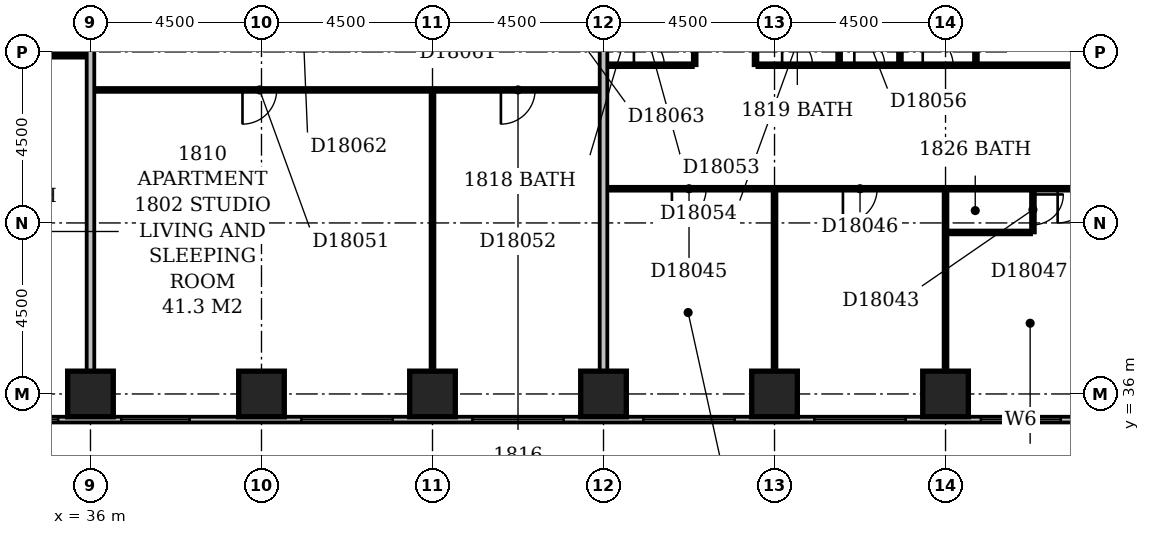
"""IFC4 building model, lengths in metres.
Left out: names, types, materials, properties, quantities, classifications, styles, units other than length and angle.
Written with IfcOpenShell. Run it as: python <this file> out.ifc"""

import sys

from ifc_helpers import new_model, si_unit, direction, frame, frame_2d, origin, origin_2d, place, context, subcontext, project, spatial, rectangle, extrude, element, fill, save


model = new_model("IFC4")
c1 = context("Model", 3, precision=1e-05, world=origin(), true_north=direction((0.0, 1.0)))
c2 = subcontext(c1, "Body", "Model", "MODEL_VIEW")
j1 = project(units=[si_unit("LENGTHUNIT", "METRE"), si_unit("PLANEANGLEUNIT", "RADIAN")], contexts=[c1])
p1 = place(None, origin())
s1 = spatial("IfcSite", under=j1, at=p1, CompositionType="ELEMENT")
p2 = place(p1, origin())
s2 = spatial("IfcBuilding", under=s1, at=p2, CompositionType="ELEMENT")
p3 = place(p2, frame((0.0, 0.0, 75.8)))
s3 = spatial("IfcBuildingStorey", under=s2, at=p3, CompositionType="ELEMENT", Elevation=75.8)
for number, where, z_axis, x_axis in (
    (1, (36.0, 36.0, -0.3), (0.0, 0.0, 1.0), (1.0, 0.0, 0.0)),
    (2, (40.5, 36.0, -0.3), (0.0, 0.0, 1.0), (1.0, 0.0, 0.0)),
    (3, (45.0, 36.0, -0.3), (0.0, 0.0, 1.0), (1.0, 0.0, 0.0)),
    (4, (49.5, 36.0, -0.3), (0.0, 0.0, 1.0), (1.0, 0.0, 0.0)),
    (5, (54.0, 36.0, -0.3), (0.0, 0.0, 1.0), (1.0, 0.0, 0.0)),
    (6, (58.5, 36.0, -0.3), (0.0, 0.0, 1.0), (1.0, 0.0, 0.0)),
):
    element("IfcColumn", number, at=place(p3, frame(where, z_axis=z_axis, x_axis=x_axis)), inside=s3, PredefinedType="COLUMN", context=c2, shape_type="SweptSolid", body=[
        extrude(rectangle(XDim=1.2, YDim=1.2, at=origin_2d()), origin(), (0.0, 0.0, 1.0), 3.6),
    ])
p4 = place(p3, frame((23.1, 35.325, 0.0), z_axis=(0.0, 0.0, 1.0), x_axis=(1.0, 0.0, 0.0)))
e7 = element("IfcWall", 7, at=p4, inside=s3, PredefinedType="STANDARD", context=c2, shape_type="SweptSolid", body=[
    extrude(rectangle(XDim=45.15, YDim=0.15, at=frame_2d((22.575, 0.0))), origin(), (0.0, 0.0, 1.0), 2.7),
])
p5 = place(p4, frame((0.45, 0.0, 0.6)))
e8 = element("IfcOpeningElement", 8, at=p5, cuts=e7, PredefinedType="OPENING", context=c2, shape_type="SweptSolid", body=[
    extrude(rectangle(XDim=2.4, YDim=1.8, at=frame_2d((1.2, 0.9))), frame((0.0, 0.087, 0.0), z_axis=(0.0, -1.0, 0.0), x_axis=(1.0, 0.0, 0.0)), (0.0, 0.0, 1.0), 0.174),
])
p6 = place(p4, frame((4.95, 0.0, 0.6)))
e9 = element("IfcOpeningElement", 9, at=p6, cuts=e7, PredefinedType="OPENING", context=c2, shape_type="SweptSolid", body=[
    extrude(rectangle(XDim=2.4, YDim=1.8, at=frame_2d((1.2, 0.9))), frame((0.0, 0.087, 0.0), z_axis=(0.0, -1.0, 0.0), x_axis=(1.0, 0.0, 0.0)), (0.0, 0.0, 1.0), 0.174),
])
p7 = place(p4, frame((10.548, 0.0, 0.6)))
e10 = element("IfcOpeningElement", 10, at=p7, cuts=e7, PredefinedType="OPENING", context=c2, shape_type="SweptSolid", body=[
    extrude(rectangle(XDim=1.5, YDim=1.8, at=frame_2d((0.75, 0.9))), frame((0.0, 0.087, 0.0), z_axis=(0.0, -1.0, 0.0), x_axis=(1.0, 0.0, 0.0)), (0.0, 0.0, 1.0), 0.174),
])
p8 = place(p4, frame((13.71, 0.0, 0.6)))
e11 = element("IfcOpeningElement", 11, at=p8, cuts=e7, PredefinedType="OPENING", context=c2, shape_type="SweptSolid", body=[
    extrude(rectangle(XDim=1.8, YDim=1.8, at=frame_2d((0.9, 0.9))), frame((0.0, 0.087, 0.0), z_axis=(0.0, -1.0, 0.0), x_axis=(1.0, 0.0, 0.0)), (0.0, 0.0, 1.0), 0.174),
])
p9 = place(p4, frame((18.45, 0.0, 0.6)))
e12 = element("IfcOpeningElement", 12, at=p9, cuts=e7, PredefinedType="OPENING", context=c2, shape_type="SweptSolid", body=[
    extrude(rectangle(XDim=2.4, YDim=1.8, at=frame_2d((1.2, 0.9))), frame((0.0, 0.087, 0.0), z_axis=(0.0, -1.0, 0.0), x_axis=(1.0, 0.0, 0.0)), (0.0, 0.0, 1.0), 0.174),
])
p10 = place(p4, frame((22.95, 0.0, 0.6)))
e13 = element("IfcOpeningElement", 13, at=p10, cuts=e7, PredefinedType="OPENING", context=c2, shape_type="SweptSolid", body=[
    extrude(rectangle(XDim=2.4, YDim=1.8, at=frame_2d((1.2, 0.9))), frame((0.0, 0.087, 0.0), z_axis=(0.0, -1.0, 0.0), x_axis=(1.0, 0.0, 0.0)), (0.0, 0.0, 1.0), 0.174),
])
p11 = place(p4, frame((27.45, 0.0, 0.6)))
e14 = element("IfcOpeningElement", 14, at=p11, cuts=e7, PredefinedType="OPENING", context=c2, shape_type="SweptSolid", body=[
    extrude(rectangle(XDim=2.4, YDim=1.8, at=frame_2d((1.2, 0.9))), frame((0.0, 0.087, 0.0), z_axis=(0.0, -1.0, 0.0), x_axis=(1.0, 0.0, 0.0)), (0.0, 0.0, 1.0), 0.174),
])
p12 = place(p4, frame((31.95, 0.0, 0.6)))
e15 = element("IfcOpeningElement", 15, at=p12, cuts=e7, PredefinedType="OPENING", context=c2, shape_type="SweptSolid", body=[
    extrude(rectangle(XDim=2.4, YDim=1.8, at=frame_2d((1.2, 0.9))), frame((0.0, 0.087, 0.0), z_axis=(0.0, -1.0, 0.0), x_axis=(1.0, 0.0, 0.0)), (0.0, 0.0, 1.0), 0.174),
])
p13 = place(p4, frame((36.331, 0.0, 0.6)))
e16 = element("IfcOpeningElement", 16, at=p13, cuts=e7, PredefinedType="OPENING", context=c2, shape_type="SweptSolid", body=[
    extrude(rectangle(XDim=2.1, YDim=1.8, at=frame_2d((1.05, 0.9))), frame((0.0, 0.087, 0.0), z_axis=(0.0, -1.0, 0.0), x_axis=(1.0, 0.0, 0.0)), (0.0, 0.0, 1.0), 0.174),
])
p14 = place(p4, frame((40.95, 0.0, 0.6)))
e17 = element("IfcOpeningElement", 17, at=p14, cuts=e7, PredefinedType="OPENING", context=c2, shape_type="SweptSolid", body=[
    extrude(rectangle(XDim=2.4, YDim=1.8, at=frame_2d((1.2, 0.9))), frame((0.0, 0.087, 0.0), z_axis=(0.0, -1.0, 0.0), x_axis=(1.0, 0.0, 0.0)), (0.0, 0.0, 1.0), 0.174),
])
p15 = place(p3, frame((36.0, 36.6, 0.0), z_axis=(0.0, 0.0, 1.0), x_axis=(0.0, 1.0, 0.0)))
e18 = element("IfcWall", 18, at=p15, inside=s3, PredefinedType="PARTITIONING", context=c2, shape_type="SweptSolid", body=[
    extrude(rectangle(XDim=12.8, YDim=0.2, at=frame_2d((6.4, 0.0))), origin(), (0.0, 0.0, 1.0), 2.4),
])
p16 = place(p3, frame((45.0, 36.6, 0.0), z_axis=(0.0, 0.0, 1.0), x_axis=(0.0, 1.0, 0.0)))
e19 = element("IfcWall", 19, at=p16, inside=s3, PredefinedType="PARTITIONING", context=c2, shape_type="SweptSolid", body=[
    extrude(rectangle(XDim=7.35, YDim=0.1, at=frame_2d((3.675, 0.0))), origin(), (0.0, 0.0, 1.0), 2.6),
])
p17 = place(p3, frame((49.5, 36.6, 0.0), z_axis=(0.0, 0.0, 1.0), x_axis=(0.0, 1.0, 0.0)))
e20 = element("IfcWall", 20, at=p17, inside=s3, PredefinedType="PARTITIONING", context=c2, shape_type="SweptSolid", body=[
    extrude(rectangle(XDim=12.8, YDim=0.2, at=frame_2d((6.4, 0.0))), origin(), (0.0, 0.0, 1.0), 3.3),
])
p18 = place(p3, frame((54.0, 36.6, 0.0), z_axis=(0.0, 0.0, 1.0), x_axis=(0.0, 1.0, 0.0)))
e21 = element("IfcWall", 21, at=p18, inside=s3, PredefinedType="PARTITIONING", context=c2, shape_type="SweptSolid", body=[
    extrude(rectangle(XDim=4.75, YDim=0.1, at=frame_2d((2.375, 0.0))), origin(), (0.0, 0.0, 1.0), 2.6),
])
p19 = place(p3, frame((58.5, 36.6, 0.0), z_axis=(0.0, 0.0, 1.0), x_axis=(0.0, 1.0, 0.0)))
e22 = element("IfcWall", 22, at=p19, inside=s3, PredefinedType="PARTITIONING", context=c2, shape_type="SweptSolid", body=[
    extrude(rectangle(XDim=4.75, YDim=0.1, at=frame_2d((2.375, 0.0))), origin(), (0.0, 0.0, 1.0), 3.3),
])
p20 = place(p3, frame((58.55, 40.25, 0.0), z_axis=(0.0, 0.0, 1.0), x_axis=(1.0, 0.0, 0.0)))
e23 = element("IfcWall", 23, at=p20, inside=s3, PredefinedType="PLUMBINGWALL", context=c2, shape_type="SweptSolid", body=[
    extrude(rectangle(XDim=2.2, YDim=0.1, at=frame_2d((1.1, 0.0))), origin(), (0.0, 0.0, 1.0), 3.3),
])
p21 = place(p3, frame((60.8, 40.25, 0.0), z_axis=(0.0, 0.0, 1.0), x_axis=(0.0, 1.0, 0.0)))
e24 = element("IfcWall", 24, at=p21, inside=s3, PredefinedType="PLUMBINGWALL", context=c2, shape_type="SweptSolid", body=[
    extrude(rectangle(XDim=1.1, YDim=0.1, at=frame_2d((0.55, 0.0))), origin(), (0.0, 0.0, 1.0), 3.3),
])
p22 = place(p21, frame((0.2, 0.0, 0.0)))
e25 = element("IfcOpeningElement", 25, at=p22, cuts=e24, PredefinedType="OPENING", context=c2, shape_type="SweptSolid", body=[
    extrude(rectangle(XDim=0.8, YDim=2.1, at=frame_2d((0.4, 1.05))), frame((0.0, 0.062, 0.0), z_axis=(0.0, -1.0, 0.0), x_axis=(1.0, 0.0, 0.0)), (0.0, 0.0, 1.0), 0.124),
])
p23 = place(p3, frame((49.6, 41.4, 0.0), z_axis=(0.0, 0.0, 1.0), x_axis=(1.0, 0.0, 0.0)))
e26 = element("IfcWall", 26, at=p23, inside=s3, PredefinedType="PARTITIONING", context=c2, shape_type="SweptSolid", body=[
    extrude(rectangle(XDim=18.5, YDim=0.1, at=frame_2d((9.25, 0.0))), origin(), (0.0, 0.0, 1.0), 3.3),
])
p24 = place(p23, frame((1.7, 0.0, 0.0)))
e27 = element("IfcOpeningElement", 27, at=p24, cuts=e26, PredefinedType="OPENING", context=c2, shape_type="SweptSolid", body=[
    extrude(rectangle(XDim=0.9, YDim=2.1, at=frame_2d((0.45, 1.05))), frame((0.0, 0.062, 0.0), z_axis=(0.0, -1.0, 0.0), x_axis=(1.0, 0.0, 0.0)), (0.0, 0.0, 1.0), 0.124),
])
p25 = place(p23, frame((6.2, 0.0, 0.0)))
e28 = element("IfcOpeningElement", 28, at=p25, cuts=e26, PredefinedType="OPENING", context=c2, shape_type="SweptSolid", body=[
    extrude(rectangle(XDim=0.9, YDim=2.1, at=frame_2d((0.45, 1.05))), frame((0.0, 0.062, 0.0), z_axis=(0.0, -1.0, 0.0), x_axis=(1.0, 0.0, 0.0)), (0.0, 0.0, 1.0), 0.124),
])
p26 = place(p23, frame((11.85, 0.0, 0.0)))
e29 = element("IfcOpeningElement", 29, at=p26, cuts=e26, PredefinedType="OPENING", context=c2, shape_type="SweptSolid", body=[
    extrude(rectangle(XDim=0.9, YDim=2.1, at=frame_2d((0.45, 1.05))), frame((0.0, 0.062, 0.0), z_axis=(0.0, -1.0, 0.0), x_axis=(1.0, 0.0, 0.0)), (0.0, 0.0, 1.0), 0.124),
])
p27 = place(p23, frame((15.2, 0.0, 0.0)))
e30 = element("IfcOpeningElement", 30, at=p27, cuts=e26, PredefinedType="OPENING", context=c2, shape_type="SweptSolid", body=[
    extrude(rectangle(XDim=0.9, YDim=2.1, at=frame_2d((0.45, 1.05))), frame((0.0, 0.062, 0.0), z_axis=(0.0, -1.0, 0.0), x_axis=(1.0, 0.0, 0.0)), (0.0, 0.0, 1.0), 0.124),
])
p28 = place(p3, frame((36.1, 44.0, 0.0), z_axis=(0.0, 0.0, 1.0), x_axis=(1.0, 0.0, 0.0)))
e31 = element("IfcWall", 31, at=p28, inside=s3, PredefinedType="PARTITIONING", context=c2, shape_type="SweptSolid", body=[
    extrude(rectangle(XDim=13.3, YDim=0.1, at=frame_2d((6.65, 0.0))), origin(), (0.0, 0.0, 1.0), 3.3),
])
p29 = place(p28, frame((3.9, 0.0, 0.0)))
e32 = element("IfcOpeningElement", 32, at=p29, cuts=e31, PredefinedType="OPENING", context=c2, shape_type="SweptSolid", body=[
    extrude(rectangle(XDim=0.9, YDim=2.1, at=frame_2d((0.45, 1.05))), frame((0.0, 0.062, 0.0), z_axis=(0.0, -1.0, 0.0), x_axis=(1.0, 0.0, 0.0)), (0.0, 0.0, 1.0), 0.124),
])
p30 = place(p28, frame((10.7, 0.0, 0.0)))
e33 = element("IfcOpeningElement", 33, at=p30, cuts=e31, PredefinedType="OPENING", context=c2, shape_type="SweptSolid", body=[
    extrude(rectangle(XDim=0.9, YDim=2.1, at=frame_2d((0.45, 1.05))), frame((0.0, 0.062, 0.0), z_axis=(0.0, -1.0, 0.0), x_axis=(1.0, 0.0, 0.0)), (0.0, 0.0, 1.0), 0.124),
])
p31 = place(p3, frame((49.6, 44.65, 0.0), z_axis=(0.0, 0.0, 1.0), x_axis=(1.0, 0.0, 0.0)))
e34 = element("IfcWall", 34, at=p31, inside=s3, PredefinedType="PARTITIONING", context=c2, shape_type="SweptSolid", body=[
    extrude(rectangle(XDim=2.25, YDim=0.1, at=frame_2d((1.125, 0.0))), origin(), (0.0, 0.0, 1.0), 3.3),
])
p32 = place(p31, frame((0.7, 0.0, 0.0)))
e35 = element("IfcOpeningElement", 35, at=p32, cuts=e34, PredefinedType="OPENING", context=c2, shape_type="SweptSolid", body=[
    extrude(rectangle(XDim=0.8, YDim=2.1, at=frame_2d((0.4, 1.05))), frame((0.0, 0.062, 0.0), z_axis=(0.0, -1.0, 0.0), x_axis=(1.0, 0.0, 0.0)), (0.0, 0.0, 1.0), 0.124),
])
p33 = place(p3, frame((51.9, 44.65, 0.0), z_axis=(0.0, 0.0, 1.0), x_axis=(0.0, 1.0, 0.0)))
e36 = element("IfcWall", 36, at=p33, inside=s3, PredefinedType="PLUMBINGWALL", context=c2, shape_type="SweptSolid", body=[
    extrude(rectangle(XDim=4.75, YDim=0.1, at=frame_2d((2.375, 0.0))), origin(), (0.0, 0.0, 1.0), 3.3),
])
p34 = place(p3, frame((53.5, 44.65, 0.0), z_axis=(0.0, 0.0, 1.0), x_axis=(0.0, 1.0, 0.0)))
e37 = element("IfcWall", 37, at=p34, inside=s3, PredefinedType="PLUMBINGWALL", context=c2, shape_type="SweptSolid", body=[
    extrude(rectangle(XDim=4.75, YDim=0.1, at=frame_2d((2.375, 0.0))), origin(), (0.0, 0.0, 1.0), 2.6),
])
p35 = place(p3, frame((53.55, 44.65, 0.0), z_axis=(0.0, 0.0, 1.0), x_axis=(1.0, 0.0, 0.0)))
e38 = element("IfcWall", 38, at=p35, inside=s3, PredefinedType="PARTITIONING", context=c2, shape_type="SweptSolid", body=[
    extrude(rectangle(XDim=13.35, YDim=0.1, at=frame_2d((6.675, 0.0))), origin(), (0.0, 0.0, 1.0), 3.3),
])
p36 = place(p35, frame((0.65, 0.0, 0.0)))
e39 = element("IfcOpeningElement", 39, at=p36, cuts=e38, PredefinedType="OPENING", context=c2, shape_type="SweptSolid", body=[
    extrude(rectangle(XDim=0.8, YDim=2.1, at=frame_2d((0.4, 1.05))), frame((0.0, 0.062, 0.0), z_axis=(0.0, -1.0, 0.0), x_axis=(1.0, 0.0, 0.0)), (0.0, 0.0, 1.0), 0.124),
])
p37 = place(p35, frame((9.4, 0.0, 0.0)))
e40 = element("IfcOpeningElement", 40, at=p37, cuts=e38, PredefinedType="OPENING", context=c2, shape_type="SweptSolid", body=[
    extrude(rectangle(XDim=0.9, YDim=2.1, at=frame_2d((0.45, 1.05))), frame((0.0, 0.062, 0.0), z_axis=(0.0, -1.0, 0.0), x_axis=(1.0, 0.0, 0.0)), (0.0, 0.0, 1.0), 0.124),
])
p38 = place(p35, frame((2.55, 0.0, 0.0)))
e41 = element("IfcOpeningElement", 41, at=p38, cuts=e38, PredefinedType="OPENING", context=c2, shape_type="SweptSolid", body=[
    extrude(rectangle(XDim=0.8, YDim=2.1, at=frame_2d((0.4, 1.05))), frame((0.0, 0.062, 0.0), z_axis=(0.0, -1.0, 0.0), x_axis=(1.0, 0.0, 0.0)), (0.0, 0.0, 1.0), 0.124),
])
p39 = place(p35, frame((4.35, 0.0, 0.0)))
e42 = element("IfcOpeningElement", 42, at=p39, cuts=e38, PredefinedType="OPENING", context=c2, shape_type="SweptSolid", body=[
    extrude(rectangle(XDim=0.8, YDim=2.1, at=frame_2d((0.4, 1.05))), frame((0.0, 0.062, 0.0), z_axis=(0.0, -1.0, 0.0), x_axis=(1.0, 0.0, 0.0)), (0.0, 0.0, 1.0), 0.124),
])
p40 = place(p3, frame((55.7, 44.7, 0.0), z_axis=(0.0, 0.0, 1.0), x_axis=(0.0, 1.0, 0.0)))
e43 = element("IfcWall", 43, at=p40, inside=s3, PredefinedType="PLUMBINGWALL", context=c2, shape_type="SweptSolid", body=[
    extrude(rectangle(XDim=4.7, YDim=0.1, at=frame_2d((2.35, 0.0))), origin(), (0.0, 0.0, 1.0), 3.3),
])
for number, where, z_axis, x_axis in (
    (44, (57.3, 44.7, 0.0), (0.0, 0.0, 1.0), (0.0, 1.0, 0.0)),
    (45, (59.3, 44.7, 0.0), (0.0, 0.0, 1.0), (0.0, 1.0, 0.0)),
):
    element("IfcWall", number, at=place(p3, frame(where, z_axis=z_axis, x_axis=x_axis)), inside=s3, PredefinedType="PARTITIONING", context=c2, shape_type="SweptSolid", body=[
        extrude(rectangle(XDim=4.7, YDim=0.1, at=frame_2d((2.35, 0.0))), origin(), (0.0, 0.0, 1.0), 3.3),
    ])
p41 = place(p3, frame((31.6, 44.9, 0.0), z_axis=(0.0, 0.0, 1.0), x_axis=(1.0, 0.0, 0.0)))
e46 = element("IfcWall", 46, at=p41, inside=s3, PredefinedType="PARTITIONING", context=c2, shape_type="SweptSolid", body=[
    extrude(rectangle(XDim=4.3, YDim=0.1, at=frame_2d((2.15, 0.0))), origin(), (0.0, 0.0, 1.0), 3.3),
])
p42 = place(p41, frame((1.7, 0.0, 0.0)))
e47 = element("IfcOpeningElement", 47, at=p42, cuts=e46, PredefinedType="OPENING", context=c2, shape_type="SweptSolid", body=[
    extrude(rectangle(XDim=0.9, YDim=2.1, at=frame_2d((0.45, 1.05))), frame((0.0, 0.062, 0.0), z_axis=(0.0, -1.0, 0.0), x_axis=(1.0, 0.0, 0.0)), (0.0, 0.0, 1.0), 0.124),
])
p43 = place(p7, origin())
e48 = element("IfcWindow", 48, at=p43, inside=s3, PartitioningType="SINGLE_PANEL", PredefinedType="WINDOW", context=c2, shape_type="SweptSolid", body=[
    extrude(rectangle(XDim=1.5, YDim=1.8, at=frame_2d((0.75, 0.9))), frame((0.0, 0.03, 0.0), z_axis=(0.0, -1.0, 0.0), x_axis=(1.0, 0.0, 0.0)), (0.0, 0.0, 1.0), 0.06),
])
fill(e10, e48)
p44 = place(p8, origin())
e49 = element("IfcWindow", 49, at=p44, inside=s3, PartitioningType="SINGLE_PANEL", PredefinedType="WINDOW", context=c2, shape_type="SweptSolid", body=[
    extrude(rectangle(XDim=1.8, YDim=1.8, at=frame_2d((0.9, 0.9))), frame((0.0, 0.03, 0.0), z_axis=(0.0, -1.0, 0.0), x_axis=(1.0, 0.0, 0.0)), (0.0, 0.0, 1.0), 0.06),
])
fill(e11, e49)
p45 = place(p9, origin())
e50 = element("IfcWindow", 50, at=p45, inside=s3, PartitioningType="SINGLE_PANEL", PredefinedType="WINDOW", context=c2, shape_type="SweptSolid", body=[
    extrude(rectangle(XDim=2.4, YDim=1.8, at=frame_2d((1.2, 0.9))), frame((0.0, 0.03, 0.0), z_axis=(0.0, -1.0, 0.0), x_axis=(1.0, 0.0, 0.0)), (0.0, 0.0, 1.0), 0.06),
])
fill(e12, e50)
p46 = place(p10, origin())
e51 = element("IfcWindow", 51, at=p46, inside=s3, PartitioningType="SINGLE_PANEL", PredefinedType="WINDOW", context=c2, shape_type="SweptSolid", body=[
    extrude(rectangle(XDim=2.4, YDim=1.8, at=frame_2d((1.2, 0.9))), frame((0.0, 0.03, 0.0), z_axis=(0.0, -1.0, 0.0), x_axis=(1.0, 0.0, 0.0)), (0.0, 0.0, 1.0), 0.06),
])
fill(e13, e51)
p47 = place(p11, origin())
e52 = element("IfcWindow", 52, at=p47, inside=s3, PartitioningType="SINGLE_PANEL", PredefinedType="WINDOW", context=c2, shape_type="SweptSolid", body=[
    extrude(rectangle(XDim=2.4, YDim=1.8, at=frame_2d((1.2, 0.9))), frame((0.0, 0.03, 0.0), z_axis=(0.0, -1.0, 0.0), x_axis=(1.0, 0.0, 0.0)), (0.0, 0.0, 1.0), 0.06),
])
fill(e14, e52)
p48 = place(p12, origin())
e53 = element("IfcWindow", 53, at=p48, inside=s3, PartitioningType="SINGLE_PANEL", PredefinedType="WINDOW", context=c2, shape_type="SweptSolid", body=[
    extrude(rectangle(XDim=2.4, YDim=1.8, at=frame_2d((1.2, 0.9))), frame((0.0, 0.03, 0.0), z_axis=(0.0, -1.0, 0.0), x_axis=(1.0, 0.0, 0.0)), (0.0, 0.0, 1.0), 0.06),
])
fill(e15, e53)
p49 = place(p13, origin())
e54 = element("IfcWindow", 54, at=p49, inside=s3, PartitioningType="SINGLE_PANEL", PredefinedType="WINDOW", context=c2, shape_type="SweptSolid", body=[
    extrude(rectangle(XDim=2.1, YDim=1.8, at=frame_2d((1.05, 0.9))), frame((0.0, 0.03, 0.0), z_axis=(0.0, -1.0, 0.0), x_axis=(1.0, 0.0, 0.0)), (0.0, 0.0, 1.0), 0.06),
])
fill(e16, e54)
p50 = place(p22, origin())
e55 = element("IfcDoor", 55, at=p50, inside=s3, OperationType="SINGLE_SWING_RIGHT", PredefinedType="DOOR", context=c2, shape_type="SweptSolid", body=[
    extrude(rectangle(XDim=0.8, YDim=2.1, at=frame_2d((0.4, 1.05))), frame((0.0, 0.025, 0.0), z_axis=(0.0, -1.0, 0.0), x_axis=(1.0, 0.0, 0.0)), (0.0, 0.0, 1.0), 0.05),
])
fill(e25, e55)
p51 = place(p24, frame((0.9, 0.0, 0.0), z_axis=(0.0, 0.0, 1.0), x_axis=(-1.0, 0.0, 0.0)))
e56 = element("IfcDoor", 56, at=p51, inside=s3, OperationType="SINGLE_SWING_RIGHT", PredefinedType="DOOR", context=c2, shape_type="SweptSolid", body=[
    extrude(rectangle(XDim=0.9, YDim=2.1, at=frame_2d((0.45, 1.05))), frame((0.0, 0.025, 0.0), z_axis=(0.0, -1.0, 0.0), x_axis=(1.0, 0.0, 0.0)), (0.0, 0.0, 1.0), 0.05),
])
fill(e27, e56)
p52 = place(p25, frame((0.9, 0.0, 0.0), z_axis=(0.0, 0.0, 1.0), x_axis=(-1.0, 0.0, 0.0)))
e57 = element("IfcDoor", 57, at=p52, inside=s3, OperationType="SINGLE_SWING_RIGHT", PredefinedType="DOOR", context=c2, shape_type="SweptSolid", body=[
    extrude(rectangle(XDim=0.9, YDim=2.1, at=frame_2d((0.45, 1.05))), frame((0.0, 0.025, 0.0), z_axis=(0.0, -1.0, 0.0), x_axis=(1.0, 0.0, 0.0)), (0.0, 0.0, 1.0), 0.05),
])
fill(e28, e57)
p53 = place(p26, frame((0.9, 0.0, 0.0), z_axis=(0.0, 0.0, 1.0), x_axis=(-1.0, 0.0, 0.0)))
e58 = element("IfcDoor", 58, at=p53, inside=s3, OperationType="SINGLE_SWING_RIGHT", PredefinedType="DOOR", context=c2, shape_type="SweptSolid", body=[
    extrude(rectangle(XDim=0.9, YDim=2.1, at=frame_2d((0.45, 1.05))), frame((0.0, 0.025, 0.0), z_axis=(0.0, -1.0, 0.0), x_axis=(1.0, 0.0, 0.0)), (0.0, 0.0, 1.0), 0.05),
])
fill(e29, e58)
p54 = place(p29, frame((0.9, 0.0, 0.0), z_axis=(0.0, 0.0, 1.0), x_axis=(-1.0, 0.0, 0.0)))
e59 = element("IfcDoor", 59, at=p54, inside=s3, OperationType="SINGLE_SWING_RIGHT", PredefinedType="DOOR", context=c2, shape_type="SweptSolid", body=[
    extrude(rectangle(XDim=0.9, YDim=2.1, at=frame_2d((0.45, 1.05))), frame((0.0, 0.025, 0.0), z_axis=(0.0, -1.0, 0.0), x_axis=(1.0, 0.0, 0.0)), (0.0, 0.0, 1.0), 0.05),
])
fill(e32, e59)
p55 = place(p30, frame((0.9, 0.0, 0.0), z_axis=(0.0, 0.0, 1.0), x_axis=(-1.0, 0.0, 0.0)))
e60 = element("IfcDoor", 60, at=p55, inside=s3, OperationType="SINGLE_SWING_RIGHT", PredefinedType="DOOR", context=c2, shape_type="SweptSolid", body=[
    extrude(rectangle(XDim=0.9, YDim=2.1, at=frame_2d((0.45, 1.05))), frame((0.0, 0.025, 0.0), z_axis=(0.0, -1.0, 0.0), x_axis=(1.0, 0.0, 0.0)), (0.0, 0.0, 1.0), 0.05),
])
fill(e33, e60)
p56 = place(p32, origin())
e61 = element("IfcDoor", 61, at=p56, inside=s3, OperationType="SINGLE_SWING_LEFT", PredefinedType="DOOR", context=c2, shape_type="SweptSolid", body=[
    extrude(rectangle(XDim=0.8, YDim=2.1, at=frame_2d((0.4, 1.05))), frame((0.0, 0.025, 0.0), z_axis=(0.0, -1.0, 0.0), x_axis=(1.0, 0.0, 0.0)), (0.0, 0.0, 1.0), 0.05),
])
fill(e35, e61)
p57 = place(p36, origin())
e62 = element("IfcDoor", 62, at=p57, inside=s3, OperationType="SINGLE_SWING_LEFT", PredefinedType="DOOR", context=c2, shape_type="SweptSolid", body=[
    extrude(rectangle(XDim=0.8, YDim=2.1, at=frame_2d((0.4, 1.05))), frame((0.0, 0.025, 0.0), z_axis=(0.0, -1.0, 0.0), x_axis=(1.0, 0.0, 0.0)), (0.0, 0.0, 1.0), 0.05),
])
fill(e39, e62)
p58 = place(p38, origin())
e63 = element("IfcDoor", 63, at=p58, inside=s3, OperationType="SINGLE_SWING_LEFT", PredefinedType="DOOR", context=c2, shape_type="SweptSolid", body=[
    extrude(rectangle(XDim=0.8, YDim=2.1, at=frame_2d((0.4, 1.05))), frame((0.0, 0.025, 0.0), z_axis=(0.0, -1.0, 0.0), x_axis=(1.0, 0.0, 0.0)), (0.0, 0.0, 1.0), 0.05),
])
fill(e41, e63)
p59 = place(p39, origin())
e64 = element("IfcDoor", 64, at=p59, inside=s3, OperationType="SINGLE_SWING_LEFT", PredefinedType="DOOR", context=c2, shape_type="SweptSolid", body=[
    extrude(rectangle(XDim=0.8, YDim=2.1, at=frame_2d((0.4, 1.05))), frame((0.0, 0.025, 0.0), z_axis=(0.0, -1.0, 0.0), x_axis=(1.0, 0.0, 0.0)), (0.0, 0.0, 1.0), 0.05),
])
fill(e42, e64)
save(model, sys.argv[1])
